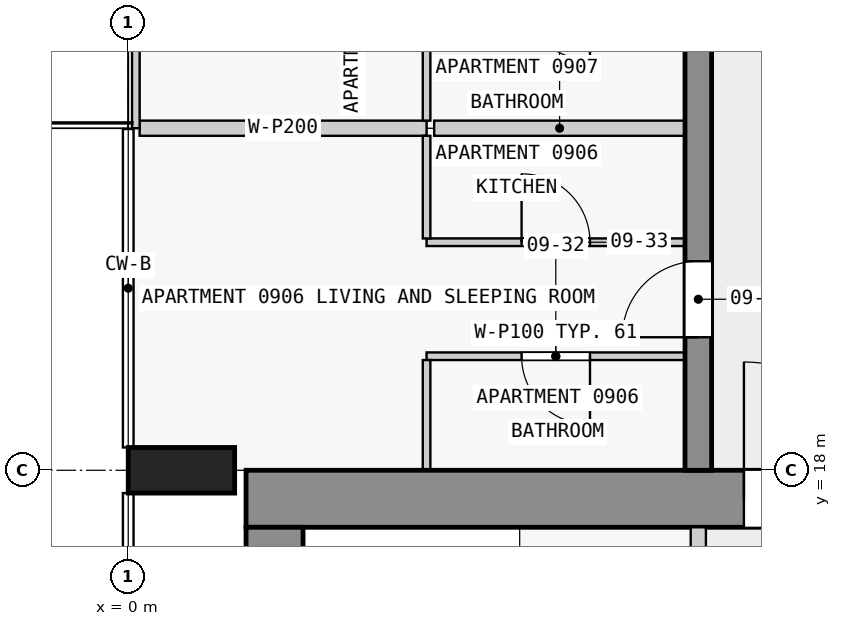
"""IFC4 building model, lengths in metres.
Left out: names, types, materials, properties, quantities, classifications, styles, units other than length and angle.
Written with IfcOpenShell. Run it as: python <this file> out.ifc"""

import sys

from ifc_helpers import new_model, si_unit, direction, frame, frame_2d, origin, origin_2d, place, context, subcontext, project, spatial, rectangle, extrude, element, fill, save


model = new_model("IFC4")
c1 = context("Model", 3, precision=1e-05, world=origin(), true_north=direction((0.0, 1.0)))
c2 = subcontext(c1, "Body", "Model", "MODEL_VIEW")
j1 = project(units=[si_unit("LENGTHUNIT", "METRE"), si_unit("PLANEANGLEUNIT", "RADIAN")], contexts=[c1])
p1 = place(None, origin())
s1 = spatial("IfcSite", under=j1, at=p1, CompositionType="ELEMENT")
p2 = place(p1, origin())
s2 = spatial("IfcBuilding", under=s1, at=p2, CompositionType="ELEMENT")
p3 = place(p2, frame((0.0, 0.0, 40.8)))
s3 = spatial("IfcBuildingStorey", under=s2, at=p3, CompositionType="ELEMENT", Elevation=40.8)
p4 = place(p3, frame((0.7, 18.0, 0.0), z_axis=(0.0, 0.0, 1.0), x_axis=(0.0, 1.0, 0.0)))
e1 = element("IfcColumn", 1, at=p4, inside=s3, PredefinedType="COLUMN", context=c2, shape_type="SweptSolid", body=[
    extrude(rectangle(XDim=0.6, YDim=1.4, at=origin_2d()), origin(), (0.0, 0.0, 1.0), 3.5),
])
p5 = place(p3, frame((1.55, 17.625, 0.0), z_axis=(0.0, 0.0, 1.0), x_axis=(1.0, 0.0, 0.0)))
e2 = element("IfcWall", 2, at=p5, inside=s3, PredefinedType="SHEAR", context=c2, shape_type="SweptSolid", body=[
    extrude(rectangle(XDim=20.95, YDim=0.75, at=frame_2d((10.475, 0.0))), origin(), (0.0, 0.0, 1.0), 3.25),
])
p6 = place(p5, frame((6.55, 0.0, 0.0)))
e3 = element("IfcOpeningElement", 3, at=p6, cuts=e2, PredefinedType="OPENING", context=c2, shape_type="SweptSolid", body=[
    extrude(rectangle(XDim=1.8, YDim=2.1, at=frame_2d((0.9, 1.05))), frame((0.0, 0.385, 0.0), z_axis=(0.0, -1.0, 0.0), x_axis=(1.0, 0.0, 0.0)), (0.0, 0.0, 1.0), 0.77),
])
p7 = place(p3, frame((1.925, 2.5, 0.0), z_axis=(0.0, 0.0, 1.0), x_axis=(0.0, 1.0, 0.0)))
e4 = element("IfcWall", 4, at=p7, inside=s3, PredefinedType="SHEAR", context=c2, shape_type="SweptSolid", body=[
    extrude(rectangle(XDim=14.75, YDim=0.75, at=frame_2d((7.375, 0.0))), origin(), (0.0, 0.0, 1.0), 3.25),
])
p8 = place(p3, frame((7.5, 18.0, 0.0), z_axis=(0.0, 0.0, 1.0), x_axis=(0.0, 1.0, 0.0)))
e5 = element("IfcWall", 5, at=p8, inside=s3, PredefinedType="SHEAR", context=c2, shape_type="SweptSolid", body=[
    extrude(rectangle(XDim=27.0, YDim=0.35, at=frame_2d((13.5, 0.0))), origin(), (0.0, 0.0, 1.0), 3.25),
])
p9 = place(p8, frame((1.75, 0.0, 0.0)))
e6 = element("IfcOpeningElement", 6, at=p9, cuts=e5, PredefinedType="OPENING", context=c2, shape_type="SweptSolid", body=[
    extrude(rectangle(XDim=1.0, YDim=2.1, at=frame_2d((0.5, 1.05))), frame((0.0, 0.185, 0.0), z_axis=(0.0, -1.0, 0.0), x_axis=(1.0, 0.0, 0.0)), (0.0, 0.0, 1.0), 0.37),
])
p10 = place(p8, frame((8.55, 0.0, 0.0)))
e7 = element("IfcOpeningElement", 7, at=p10, cuts=e5, PredefinedType="OPENING", context=c2, shape_type="SweptSolid", body=[
    extrude(rectangle(XDim=1.0, YDim=2.1, at=frame_2d((0.5, 1.05))), frame((0.0, 0.185, 0.0), z_axis=(0.0, -1.0, 0.0), x_axis=(1.0, 0.0, 0.0)), (0.0, 0.0, 1.0), 0.37),
])
p11 = place(p8, frame((15.25, 0.0, 0.0)))
e8 = element("IfcOpeningElement", 8, at=p11, cuts=e5, PredefinedType="OPENING", context=c2, shape_type="SweptSolid", body=[
    extrude(rectangle(XDim=1.0, YDim=2.1, at=frame_2d((0.5, 1.05))), frame((0.0, 0.185, 0.0), z_axis=(0.0, -1.0, 0.0), x_axis=(1.0, 0.0, 0.0)), (0.0, 0.0, 1.0), 0.37),
])
p12 = place(p8, frame((21.35, 0.0, 0.0)))
e9 = element("IfcOpeningElement", 9, at=p12, cuts=e5, PredefinedType="OPENING", context=c2, shape_type="SweptSolid", body=[
    extrude(rectangle(XDim=1.0, YDim=2.1, at=frame_2d((0.5, 1.05))), frame((0.0, 0.185, 0.0), z_axis=(0.0, -1.0, 0.0), x_axis=(1.0, 0.0, 0.0)), (0.0, 0.0, 1.0), 0.37),
])
p13 = place(p3, frame((0.1, 22.5, 0.0), z_axis=(0.0, 0.0, 1.0), x_axis=(0.0, 1.0, 0.0)))
e10 = element("IfcWall", 10, at=p13, inside=s3, PredefinedType="STANDARD", context=c2, shape_type="SweptSolid", body=[
    extrude(rectangle(XDim=4.5, YDim=0.1, at=frame_2d((2.25, 0.0))), origin(), (0.0, 0.0, 1.0), 3.25),
])
p14 = place(p13, frame((1.05, 0.0, 0.0)))
e11 = element("IfcOpeningElement", 11, at=p14, cuts=e10, PredefinedType="OPENING", context=c2, shape_type="SweptSolid", body=[
    extrude(rectangle(XDim=2.4, YDim=2.4, at=frame_2d((1.2, 1.2))), frame((0.0, 0.06, 0.0), z_axis=(0.0, -1.0, 0.0), x_axis=(1.0, 0.0, 0.0)), (0.0, 0.0, 1.0), 0.12),
])
p15 = place(p3, frame((7.5, 10.1, 0.0), z_axis=(0.0, 0.0, 1.0), x_axis=(0.0, 1.0, 0.0)))
e12 = element("IfcWall", 12, at=p15, inside=s3, PredefinedType="PARTITIONING", context=c2, shape_type="SweptSolid", body=[
    extrude(rectangle(XDim=7.15, YDim=0.2, at=frame_2d((3.575, 0.0))), origin(), (0.0, 0.0, 1.0), 3.25),
])
p16 = place(p15, frame((0.775, 0.0, 0.0)))
e13 = element("IfcOpeningElement", 13, at=p16, cuts=e12, PredefinedType="OPENING", context=c2, shape_type="SweptSolid", body=[
    extrude(rectangle(XDim=0.9, YDim=2.1, at=frame_2d((0.45, 1.05))), frame((0.0, 0.11, 0.0), z_axis=(0.0, -1.0, 0.0), x_axis=(1.0, 0.0, 0.0)), (0.0, 0.0, 1.0), 0.22),
])
p17 = place(p15, frame((3.225, 0.0, 0.0)))
e14 = element("IfcOpeningElement", 14, at=p17, cuts=e12, PredefinedType="OPENING", context=c2, shape_type="SweptSolid", body=[
    extrude(rectangle(XDim=0.9, YDim=2.1, at=frame_2d((0.45, 1.05))), frame((0.0, 0.11, 0.0), z_axis=(0.0, -1.0, 0.0), x_axis=(1.0, 0.0, 0.0)), (0.0, 0.0, 1.0), 0.22),
])
p18 = place(p15, frame((5.25, 0.0, 0.0)))
e15 = element("IfcOpeningElement", 15, at=p18, cuts=e12, PredefinedType="OPENING", context=c2, shape_type="SweptSolid", body=[
    extrude(rectangle(XDim=0.9, YDim=2.1, at=frame_2d((0.45, 1.05))), frame((0.0, 0.11, 0.0), z_axis=(0.0, -1.0, 0.0), x_axis=(1.0, 0.0, 0.0)), (0.0, 0.0, 1.0), 0.22),
])
p19 = place(p3, frame((7.325, 19.5, 0.0), z_axis=(0.0, 0.0, 1.0), x_axis=(-1.0, 0.0, 0.0)))
e16 = element("IfcWall", 16, at=p19, inside=s3, PredefinedType="PARTITIONING", context=c2, shape_type="SweptSolid", body=[
    extrude(rectangle(XDim=3.4, YDim=0.1, at=frame_2d((1.7, 0.0))), origin(), (0.0, 0.0, 1.0), 3.25),
])
p20 = place(p19, frame((1.25, 0.0, 0.0)))
e17 = element("IfcOpeningElement", 17, at=p20, cuts=e16, PredefinedType="OPENING", context=c2, shape_type="SweptSolid", body=[
    extrude(rectangle(XDim=0.9, YDim=2.1, at=frame_2d((0.45, 1.05))), frame((0.0, 0.06, 0.0), z_axis=(0.0, -1.0, 0.0), x_axis=(1.0, 0.0, 0.0)), (0.0, 0.0, 1.0), 0.12),
])
p21 = place(p3, frame((3.925, 21.0, 0.0), z_axis=(0.0, 0.0, 1.0), x_axis=(1.0, 0.0, 0.0)))
e18 = element("IfcWall", 18, at=p21, inside=s3, PredefinedType="PARTITIONING", context=c2, shape_type="SweptSolid", body=[
    extrude(rectangle(XDim=3.4, YDim=0.1, at=frame_2d((1.7, 0.0))), origin(), (0.0, 0.0, 1.0), 3.25),
])
p22 = place(p21, frame((1.25, 0.0, 0.0)))
e19 = element("IfcOpeningElement", 19, at=p22, cuts=e18, PredefinedType="OPENING", context=c2, shape_type="SweptSolid", body=[
    extrude(rectangle(XDim=0.9, YDim=2.1, at=frame_2d((0.45, 1.05))), frame((0.0, 0.06, 0.0), z_axis=(0.0, -1.0, 0.0), x_axis=(1.0, 0.0, 0.0)), (0.0, 0.0, 1.0), 0.12),
])
p23 = place(p3, frame((7.325, 22.5, 0.0), z_axis=(0.0, 0.0, 1.0), x_axis=(-1.0, 0.0, 0.0)))
e20 = element("IfcWall", 20, at=p23, inside=s3, PredefinedType="PARTITIONING", context=c2, shape_type="SweptSolid", body=[
    extrude(rectangle(XDim=3.3, YDim=0.2, at=frame_2d((1.65, 0.0))), origin(), (0.0, 0.0, 1.0), 3.25),
])
p24 = place(p3, frame((0.15, 22.5, 0.0), z_axis=(0.0, 0.0, 1.0), x_axis=(1.0, 0.0, 0.0)))
e21 = element("IfcWall", 21, at=p24, inside=s3, PredefinedType="PARTITIONING", context=c2, shape_type="SweptSolid", body=[
    extrude(rectangle(XDim=3.775, YDim=0.2, at=frame_2d((1.888, 0.0))), origin(), (0.0, 0.0, 1.0), 3.25),
])
p25 = place(p3, frame((3.925, 19.45, 0.0), z_axis=(0.0, 0.0, 1.0), x_axis=(0.0, -1.0, 0.0)))
e22 = element("IfcWall", 22, at=p25, inside=s3, PredefinedType="PARTITIONING", context=c2, shape_type="SweptSolid", body=[
    extrude(rectangle(XDim=1.45, YDim=0.1, at=frame_2d((0.725, 0.0))), origin(), (0.0, 0.0, 1.0), 3.25),
])
p26 = place(p3, frame((3.925, 22.4, 0.0), z_axis=(0.0, 0.0, 1.0), x_axis=(0.0, -1.0, 0.0)))
e23 = element("IfcWall", 23, at=p26, inside=s3, PredefinedType="PARTITIONING", context=c2, shape_type="SweptSolid", body=[
    extrude(rectangle(XDim=1.35, YDim=0.1, at=frame_2d((0.675, 0.0))), origin(), (0.0, 0.0, 1.0), 3.25),
])
p27 = place(p3, frame((3.925, 24.25, 0.0), z_axis=(0.0, 0.0, 1.0), x_axis=(0.0, -1.0, 0.0)))
e24 = element("IfcWall", 24, at=p27, inside=s3, PredefinedType="PARTITIONING", context=c2, shape_type="SweptSolid", body=[
    extrude(rectangle(XDim=1.65, YDim=0.1, at=frame_2d((0.825, 0.0))), origin(), (0.0, 0.0, 1.0), 3.25),
])
p28 = place(p6, origin())
e25 = element("IfcDoor", 25, at=p28, inside=s3, OperationType="DOUBLE_DOOR_SINGLE_SWING", PredefinedType="DOOR", context=c2, shape_type="SweptSolid", body=[
    extrude(rectangle(XDim=1.8, YDim=2.1, at=frame_2d((0.9, 1.05))), frame((0.0, 0.025, 0.0), z_axis=(0.0, -1.0, 0.0), x_axis=(1.0, 0.0, 0.0)), (0.0, 0.0, 1.0), 0.05),
])
fill(e3, e25)
p29 = place(p9, origin())
e26 = element("IfcDoor", 26, at=p29, inside=s3, OperationType="SINGLE_SWING_LEFT", PredefinedType="DOOR", context=c2, shape_type="SweptSolid", body=[
    extrude(rectangle(XDim=1.0, YDim=2.1, at=frame_2d((0.5, 1.05))), frame((0.0, 0.025, 0.0), z_axis=(0.0, -1.0, 0.0), x_axis=(1.0, 0.0, 0.0)), (0.0, 0.0, 1.0), 0.05),
])
fill(e6, e26)
p30 = place(p20, origin())
e27 = element("IfcDoor", 27, at=p30, inside=s3, OperationType="SINGLE_SWING_LEFT", PredefinedType="DOOR", context=c2, shape_type="SweptSolid", body=[
    extrude(rectangle(XDim=0.9, YDim=2.1, at=frame_2d((0.45, 1.05))), frame((0.0, 0.025, 0.0), z_axis=(0.0, -1.0, 0.0), x_axis=(1.0, 0.0, 0.0)), (0.0, 0.0, 1.0), 0.05),
])
fill(e17, e27)
p31 = place(p22, origin())
e28 = element("IfcDoor", 28, at=p31, inside=s3, OperationType="SINGLE_SWING_LEFT", PredefinedType="DOOR", context=c2, shape_type="SweptSolid", body=[
    extrude(rectangle(XDim=0.9, YDim=2.1, at=frame_2d((0.45, 1.05))), frame((0.0, 0.025, 0.0), z_axis=(0.0, -1.0, 0.0), x_axis=(1.0, 0.0, 0.0)), (0.0, 0.0, 1.0), 0.05),
])
fill(e19, e28)
save(model, sys.argv[1])
